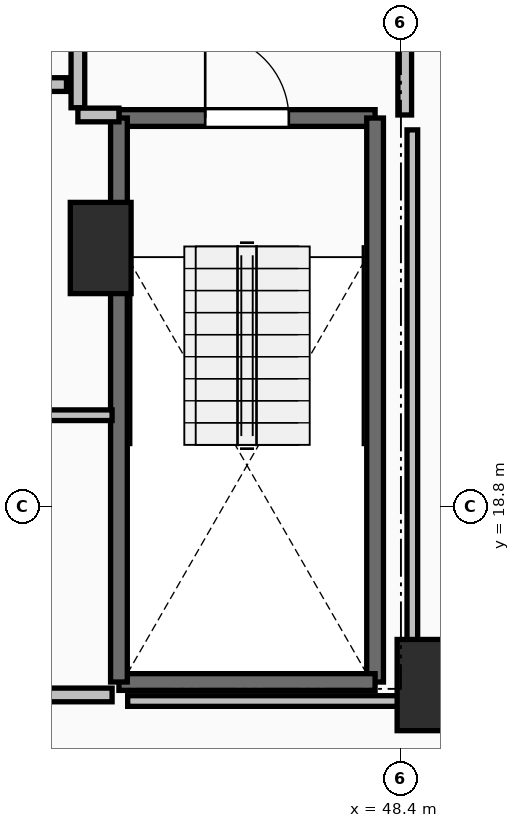
"""IFC4 building model, lengths in metres.
Left out: names, types, materials, properties, quantities, classifications, styles, units other than length and angle.
Written with IfcOpenShell. Run it as: python <this file> out.ifc"""

import sys

from ifc_helpers import new_model, si_unit, direction, frame, frame_2d, origin, origin_2d, place, context, subcontext, project, spatial, rectangle, extrude, element, fill, save


model = new_model("IFC4")
c1 = context("Model", 3, precision=1e-05, world=origin(), true_north=direction((0.0, 1.0)))
c2 = subcontext(c1, "Body", "Model", "MODEL_VIEW")
j1 = project(units=[si_unit("LENGTHUNIT", "METRE"), si_unit("PLANEANGLEUNIT", "RADIAN")], contexts=[c1])
p1 = place(None, origin())
s1 = spatial("IfcSite", under=j1, at=p1, CompositionType="ELEMENT")
p2 = place(p1, origin())
s2 = spatial("IfcBuilding", under=s1, at=p2, CompositionType="ELEMENT")
p3 = place(p2, frame((0.0, 0.0, 62.5)))
s3 = spatial("IfcBuildingStorey", under=s2, at=p3, CompositionType="ELEMENT", Elevation=62.5)
for number, where, z_axis, x_axis in (
    (1, (48.75, 16.45, 0.0), (0.0, 0.0, 1.0), (1.0, 0.0, 0.0)),
    (2, (44.45, 22.2, 0.0), (0.0, 0.0, 1.0), (1.0, 0.0, 0.0)),
):
    element("IfcColumn", number, at=place(p3, frame(where, z_axis=z_axis, x_axis=x_axis)), inside=s3, PredefinedType="PILASTER", context=c2, shape_type="SweptSolid", body=[
        extrude(rectangle(XDim=0.8, YDim=1.2, at=origin_2d()), origin(), (0.0, 0.0, 1.0), 3.5),
    ])
p4 = place(p3, frame((44.69, 23.91, 0.0), z_axis=(0.0, 0.0, 1.0), x_axis=(1.0, 0.0, 0.0)))
e3 = element("IfcWall", 3, at=p4, inside=s3, PredefinedType="SOLIDWALL", context=c2, shape_type="SweptSolid", body=[
    extrude(rectangle(XDim=3.37, YDim=0.22, at=frame_2d((1.685, 0.0))), origin(), (0.0, 0.0, 1.0), 3.24),
])
p5 = place(p4, frame((1.135, 0.0, 0.0)))
e4 = element("IfcOpeningElement", 4, at=p5, cuts=e3, PredefinedType="OPENING", context=c2, shape_type="SweptSolid", body=[
    extrude(rectangle(XDim=1.1, YDim=2.15, at=frame_2d((0.55, 1.075))), frame((0.0, 0.125, 0.0), z_axis=(0.0, -1.0, 0.0), x_axis=(1.0, 0.0, 0.0)), (0.0, 0.0, 1.0), 0.25),
])
p6 = place(p3, frame((48.06, 23.91, 0.0), z_axis=(0.0, 0.0, 1.0), x_axis=(0.0, -1.0, 0.0)))
e5 = element("IfcWall", 5, at=p6, inside=s3, PredefinedType="SOLIDWALL", context=c2, shape_type="SweptSolid", body=[
    extrude(rectangle(XDim=7.42, YDim=0.22, at=frame_2d((3.71, 0.0))), origin(), (0.0, 0.0, 1.0), 3.24),
])
p7 = place(p3, frame((48.06, 16.49, 0.0), z_axis=(0.0, 0.0, 1.0), x_axis=(-1.0, 0.0, 0.0)))
e6 = element("IfcWall", 6, at=p7, inside=s3, PredefinedType="SOLIDWALL", context=c2, shape_type="SweptSolid", body=[
    extrude(rectangle(XDim=3.37, YDim=0.22, at=frame_2d((1.685, 0.0))), origin(), (0.0, 0.0, 1.0), 3.24),
])
p8 = place(p3, frame((44.69, 16.49, 0.0), z_axis=(0.0, 0.0, 1.0), x_axis=(0.0, 1.0, 0.0)))
e7 = element("IfcWall", 7, at=p8, inside=s3, PredefinedType="SOLIDWALL", context=c2, shape_type="SweptSolid", body=[
    extrude(rectangle(XDim=7.42, YDim=0.22, at=frame_2d((3.71, 0.0))), origin(), (0.0, 0.0, 1.0), 3.24),
])
p9 = place(p3, frame((44.15, 27.955, 0.0), z_axis=(0.0, 0.0, 1.0), x_axis=(0.0, -1.0, 0.0)))
e8 = element("IfcWall", 8, at=p9, inside=s3, PredefinedType="PARTITIONING", context=c2, shape_type="SweptSolid", body=[
    extrude(rectangle(XDim=3.91, YDim=0.18, at=frame_2d((1.955, 0.0))), origin(), (0.0, 0.0, 1.0), 3.24),
])
p10 = place(p9, frame((1.355, 0.0, 0.0)))
e9 = element("IfcOpeningElement", 9, at=p10, cuts=e8, PredefinedType="OPENING", context=c2, shape_type="SweptSolid", body=[
    extrude(rectangle(XDim=1.2, YDim=2.15, at=frame_2d((0.6, 1.075))), frame((0.0, 0.105, 0.0), z_axis=(0.0, -1.0, 0.0), x_axis=(1.0, 0.0, 0.0)), (0.0, 0.0, 1.0), 0.21),
])
p11 = place(p3, frame((44.15, 23.95, 0.0), z_axis=(0.0, 0.0, 1.0), x_axis=(1.0, 0.0, 0.0)))
e10 = element("IfcWall", 10, at=p11, inside=s3, PredefinedType="PARTITIONING", context=c2, shape_type="SweptSolid", body=[
    extrude(rectangle(XDim=0.54, YDim=0.18, at=frame_2d((0.27, 0.0))), origin(), (0.0, 0.0, 1.0), 3.24),
])
p12 = place(p3, frame((48.45, 23.95, 0.0), z_axis=(0.0, 0.0, 1.0), x_axis=(0.0, 1.0, 0.0)))
e11 = element("IfcWall", 11, at=p12, inside=s3, PredefinedType="PARTITIONING", context=c2, shape_type="SweptSolid", body=[
    extrude(rectangle(XDim=4.05, YDim=0.18, at=frame_2d((2.025, 0.0))), origin(), (0.0, 0.0, 1.0), 3.24),
])
p13 = place(p12, frame((1.425, 0.0, 0.0)))
e12 = element("IfcOpeningElement", 12, at=p13, cuts=e11, PredefinedType="OPENING", context=c2, shape_type="SweptSolid", body=[
    extrude(rectangle(XDim=1.2, YDim=2.15, at=frame_2d((0.6, 1.075))), frame((0.0, 0.105, 0.0), z_axis=(0.0, -1.0, 0.0), x_axis=(1.0, 0.0, 0.0)), (0.0, 0.0, 1.0), 0.21),
])
p14 = place(p3, frame((41.555, 24.35, 0.0), z_axis=(0.0, 0.0, 1.0), x_axis=(1.0, 0.0, 0.0)))
e13 = element("IfcWall", 13, at=p14, inside=s3, PredefinedType="PARTITIONING", context=c2, shape_type="SweptSolid", body=[
    extrude(rectangle(XDim=2.445, YDim=0.18, at=frame_2d((1.223, 0.0))), origin(), (0.0, 0.0, 1.0), 3.24),
])
p15 = place(p14, frame((0.798, 0.0, 0.0)))
e14 = element("IfcOpeningElement", 14, at=p15, cuts=e13, PredefinedType="OPENING", context=c2, shape_type="SweptSolid", body=[
    extrude(rectangle(XDim=0.85, YDim=2.1, at=frame_2d((0.425, 1.05))), frame((0.0, 0.105, 0.0), z_axis=(0.0, -1.0, 0.0), x_axis=(1.0, 0.0, 0.0)), (0.0, 0.0, 1.0), 0.21),
])
p16 = place(p3, frame((44.6, 20.0, 0.0), z_axis=(0.0, 0.0, 1.0), x_axis=(-1.0, 0.0, 0.0)))
e15 = element("IfcWall", 15, at=p16, inside=s3, PredefinedType="PARTITIONING", context=c2, shape_type="SweptSolid", body=[
    extrude(rectangle(XDim=3.2, YDim=0.14, at=frame_2d((1.6, 0.0))), origin(), (0.0, 0.0, 1.0), 3.24),
])
p17 = place(p3, frame((41.4, 16.32, 0.0), z_axis=(0.0, 0.0, 1.0), x_axis=(1.0, 0.0, 0.0)))
e16 = element("IfcWall", 16, at=p17, inside=s3, PredefinedType="PARTITIONING", context=c2, shape_type="SweptSolid", body=[
    extrude(rectangle(XDim=3.2, YDim=0.18, at=frame_2d((1.6, 0.0))), origin(), (0.0, 0.0, 1.0), 3.24),
])
p18 = place(p17, frame((1.2, 0.0, 0.0)))
e17 = element("IfcOpeningElement", 17, at=p18, cuts=e16, PredefinedType="OPENING", context=c2, shape_type="SweptSolid", body=[
    extrude(rectangle(XDim=0.8, YDim=2.05, at=frame_2d((0.4, 1.025))), frame((0.0, 0.105, 0.0), z_axis=(0.0, -1.0, 0.0), x_axis=(1.0, 0.0, 0.0)), (0.0, 0.0, 1.0), 0.21),
])
p19 = place(p3, frame((48.55, 23.754, 0.0), z_axis=(0.0, 0.0, 1.0), x_axis=(0.0, -1.0, 0.0)))
e18 = element("IfcWall", 18, at=p19, inside=s3, PredefinedType="PARTITIONING", context=c2, shape_type="SweptSolid", body=[
    extrude(rectangle(XDim=7.514, YDim=0.14, at=frame_2d((3.757, 0.0))), origin(), (0.0, 0.0, 1.0), 2.432),
])
p20 = place(p3, frame((48.55, 16.24, 0.0), z_axis=(0.0, 0.0, 1.0), x_axis=(-1.0, 0.0, 0.0)))
e19 = element("IfcWall", 19, at=p20, inside=s3, PredefinedType="PARTITIONING", context=c2, shape_type="SweptSolid", body=[
    extrude(rectangle(XDim=3.745, YDim=0.14, at=frame_2d((1.873, 0.0))), origin(), (0.0, 0.0, 1.0), 2.432),
])
p21 = place(p5, origin())
e20 = element("IfcDoor", 20, at=p21, inside=s3, OperationType="SINGLE_SWING_LEFT", PredefinedType="DOOR", context=c2, shape_type="SweptSolid", body=[
    extrude(rectangle(XDim=1.1, YDim=2.15, at=frame_2d((0.55, 1.075))), frame((0.0, 0.025, 0.0), z_axis=(0.0, -1.0, 0.0), x_axis=(1.0, 0.0, 0.0)), (0.0, 0.0, 1.0), 0.05),
])
fill(e4, e20)
save(model, sys.argv[1])
